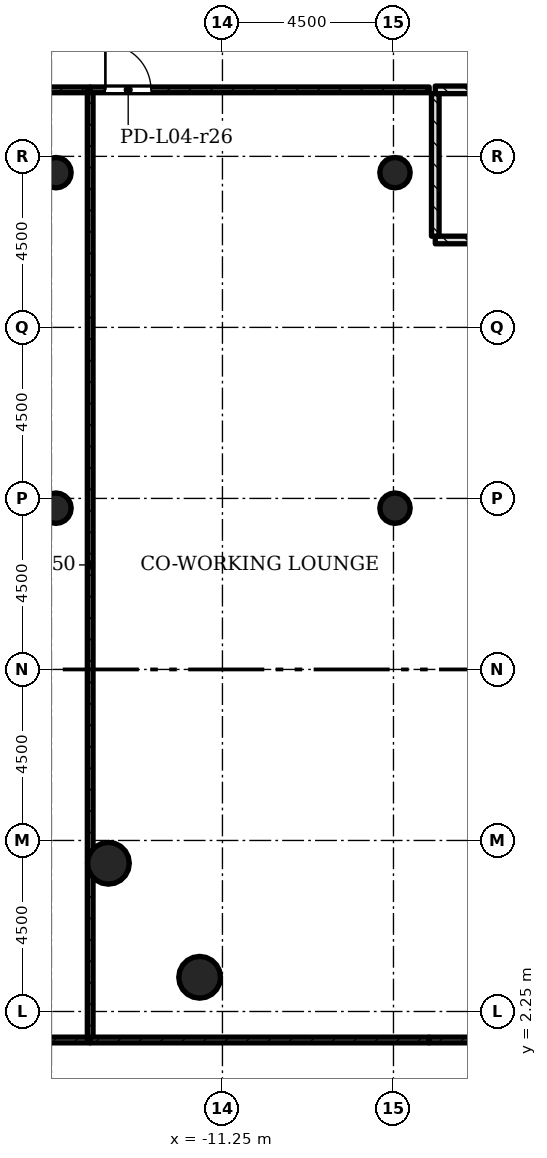
"""IFC4 building model, lengths in metres.
Left out: names, types, materials, properties, quantities, classifications, styles, units other than length and angle.
Written with IfcOpenShell. Run it as: python <this file> out.ifc"""

import sys

from ifc_helpers import new_model, si_unit, direction, frame, frame_2d, origin, origin_2d, place, context, subcontext, project, spatial, rectangle, hollow_circle, extrude, element, fill, save


model = new_model("IFC4")
c1 = context("Model", 3, precision=1e-05, world=origin(), true_north=direction((0.0, 1.0)))
c2 = subcontext(c1, "Body", "Model", "MODEL_VIEW")
j1 = project(units=[si_unit("LENGTHUNIT", "METRE"), si_unit("PLANEANGLEUNIT", "RADIAN")], contexts=[c1])
p1 = place(None, origin())
s1 = spatial("IfcSite", under=j1, at=p1, CompositionType="ELEMENT")
p2 = place(p1, origin())
s2 = spatial("IfcBuilding", under=s1, at=p2, CompositionType="ELEMENT")
p3 = place(p2, frame((0.0, 0.0, 20.0)))
s3 = spatial("IfcBuildingStorey", under=s2, at=p3, CompositionType="ELEMENT", Elevation=20.0)
for number, where, z_axis, x_axis in (
    (1, (-14.25, 6.15, 0.0), (0.0, 0.0, 1.0), (1.0, 0.0, 0.0)),
    (2, (-11.85, 3.15, 0.0), (0.0, 0.0, 1.0), (1.0, 0.0, 0.0)),
):
    element("IfcColumn", number, at=place(p3, frame(where, z_axis=z_axis, x_axis=x_axis)), inside=s3, PredefinedType="COLUMN", context=c2, shape_type="SweptSolid", body=[
        extrude(hollow_circle(Radius=0.55, WallThickness=0.04, at=origin_2d()), origin(), (0.0, 0.0, 1.0), 4.5),
    ])
for number, where, z_axis, x_axis in (
    (3, (-15.63, 15.493, 0.0), (0.0, 0.0, 1.0), (1.0, 0.0, 0.0)),
    (4, (-6.71, 15.493, 0.0), (0.0, 0.0, 1.0), (1.0, 0.0, 0.0)),
    (5, (-15.63, 24.321, 0.0), (0.0, 0.0, 1.0), (1.0, 0.0, 0.0)),
    (6, (-6.71, 24.321, 0.0), (0.0, 0.0, 1.0), (1.0, 0.0, 0.0)),
):
    element("IfcColumn", number, at=place(p3, frame(where, z_axis=z_axis, x_axis=x_axis)), inside=s3, PredefinedType="COLUMN", context=c2, shape_type="SweptSolid", body=[
        extrude(hollow_circle(Radius=0.4, WallThickness=0.028, at=origin_2d()), origin(), (0.0, 0.0, 1.0), 4.08),
    ])
p4 = place(p3, frame((-23.65, 26.5, 0.0), z_axis=(0.0, 0.0, 1.0), x_axis=(1.0, 0.0, 0.0)))
e7 = element("IfcWall", 7, at=p4, inside=s3, PredefinedType="PARTITIONING", context=c2, shape_type="SweptSolid", body=[
    extrude(rectangle(XDim=8.92, YDim=0.15, at=frame_2d((4.46, 0.0))), origin(), (0.0, 0.0, 1.0), 4.075),
])
p5 = place(p4, frame((0.4, 0.0, 0.0)))
e8 = element("IfcOpeningElement", 8, at=p5, cuts=e7, PredefinedType="OPENING", context=c2, shape_type="SweptSolid", body=[
    extrude(rectangle(XDim=1.2, YDim=2.1, at=frame_2d((0.6, 1.05))), frame((0.0, 0.085, 0.0), z_axis=(0.0, -1.0, 0.0), x_axis=(1.0, 0.0, 0.0)), (0.0, 0.0, 1.0), 0.17),
])
p6 = place(p3, frame((-14.73, 1.5, 0.0), z_axis=(0.0, 0.0, 1.0), x_axis=(-1.0, 0.0, 0.0)))
e9 = element("IfcWall", 9, at=p6, inside=s3, PredefinedType="PARTITIONING", context=c2, shape_type="SweptSolid", body=[
    extrude(rectangle(XDim=5.52, YDim=0.15, at=frame_2d((2.76, 0.0))), origin(), (0.0, 0.0, 1.0), 4.075),
])
p7 = place(p3, frame((-14.73, 26.5, 0.0), z_axis=(0.0, 0.0, 1.0), x_axis=(0.0, -1.0, 0.0)))
e10 = element("IfcWall", 10, at=p7, inside=s3, PredefinedType="PARTITIONING", context=c2, shape_type="SweptSolid", body=[
    extrude(rectangle(XDim=25.0, YDim=0.15, at=frame_2d((12.5, 0.0))), origin(), (0.0, 0.0, 1.0), 4.075),
])
p8 = place(p3, frame((-14.73, 26.5, 0.0), z_axis=(0.0, 0.0, 1.0), x_axis=(1.0, 0.0, 0.0)))
e11 = element("IfcWall", 11, at=p8, inside=s3, PredefinedType="PARTITIONING", context=c2, shape_type="SweptSolid", body=[
    extrude(rectangle(XDim=8.92, YDim=0.15, at=frame_2d((4.46, 0.0))), origin(), (0.0, 0.0, 1.0), 4.075),
])
p9 = place(p8, frame((0.4, 0.0, 0.0)))
e12 = element("IfcOpeningElement", 12, at=p9, cuts=e11, PredefinedType="OPENING", context=c2, shape_type="SweptSolid", body=[
    extrude(rectangle(XDim=1.2, YDim=2.1, at=frame_2d((0.6, 1.05))), frame((0.0, 0.085, 0.0), z_axis=(0.0, -1.0, 0.0), x_axis=(1.0, 0.0, 0.0)), (0.0, 0.0, 1.0), 0.17),
])
p10 = place(p3, frame((-5.81, 1.5, 0.0), z_axis=(0.0, 0.0, 1.0), x_axis=(-1.0, 0.0, 0.0)))
e13 = element("IfcWall", 13, at=p10, inside=s3, PredefinedType="PARTITIONING", context=c2, shape_type="SweptSolid", body=[
    extrude(rectangle(XDim=8.92, YDim=0.15, at=frame_2d((4.46, 0.0))), origin(), (0.0, 0.0, 1.0), 4.075),
])
p11 = place(p3, frame((-5.65, 26.5, 0.0), z_axis=(0.0, 0.0, 1.0), x_axis=(1.0, 0.0, 0.0)))
e14 = element("IfcWall", 14, at=p11, inside=s3, PredefinedType="SHEAR", context=c2, shape_type="SweptSolid", body=[
    extrude(rectangle(XDim=6.8, YDim=0.2, at=frame_2d((3.4, 0.0))), origin(), (0.0, 0.0, 1.0), 4.075),
])
p12 = place(p11, frame((5.35, 0.0, 0.0)))
e15 = element("IfcOpeningElement", 15, at=p12, cuts=e14, PredefinedType="OPENING", context=c2, shape_type="SweptSolid", body=[
    extrude(rectangle(XDim=0.9, YDim=2.1, at=frame_2d((0.45, 1.05))), frame((0.0, 0.11, 0.0), z_axis=(0.0, -1.0, 0.0), x_axis=(1.0, 0.0, 0.0)), (0.0, 0.0, 1.0), 0.22),
])
p13 = place(p3, frame((-5.65, 22.55, 0.0), z_axis=(0.0, 0.0, 1.0), x_axis=(1.0, 0.0, 0.0)))
e16 = element("IfcWall", 16, at=p13, inside=s3, PredefinedType="SHEAR", context=c2, shape_type="SweptSolid", body=[
    extrude(rectangle(XDim=6.8, YDim=0.2, at=frame_2d((3.4, 0.0))), origin(), (0.0, 0.0, 1.0), 4.075),
])
p14 = place(p3, frame((-5.65, 22.65, 0.0), z_axis=(0.0, 0.0, 1.0), x_axis=(0.0, 1.0, 0.0)))
e17 = element("IfcWall", 17, at=p14, inside=s3, PredefinedType="SHEAR", context=c2, shape_type="SweptSolid", body=[
    extrude(rectangle(XDim=3.75, YDim=0.2, at=frame_2d((1.875, 0.0))), origin(), (0.0, 0.0, 1.0), 4.075),
])
p15 = place(p3, frame((3.11, 1.5, 0.0), z_axis=(0.0, 0.0, 1.0), x_axis=(-1.0, 0.0, 0.0)))
e18 = element("IfcWall", 18, at=p15, inside=s3, PredefinedType="PARTITIONING", context=c2, shape_type="SweptSolid", body=[
    extrude(rectangle(XDim=8.92, YDim=0.15, at=frame_2d((4.46, 0.0))), origin(), (0.0, 0.0, 1.0), 4.075),
])
p16 = place(p15, frame((0.4, 0.0, 0.0)))
e19 = element("IfcOpeningElement", 19, at=p16, cuts=e18, PredefinedType="OPENING", context=c2, shape_type="SweptSolid", body=[
    extrude(rectangle(XDim=1.2, YDim=2.1, at=frame_2d((0.6, 1.05))), frame((0.0, 0.085, 0.0), z_axis=(0.0, -1.0, 0.0), x_axis=(1.0, 0.0, 0.0)), (0.0, 0.0, 1.0), 0.17),
])
p17 = place(p9, origin())
e20 = element("IfcDoor", 20, at=p17, inside=s3, OperationType="SINGLE_SWING_RIGHT", PredefinedType="DOOR", context=c2, shape_type="SweptSolid", body=[
    extrude(rectangle(XDim=1.2, YDim=2.1, at=frame_2d((0.6, 1.05))), frame((0.0, 0.025, 0.0), z_axis=(0.0, -1.0, 0.0), x_axis=(1.0, 0.0, 0.0)), (0.0, 0.0, 1.0), 0.05),
])
fill(e12, e20)
save(model, sys.argv[1])
